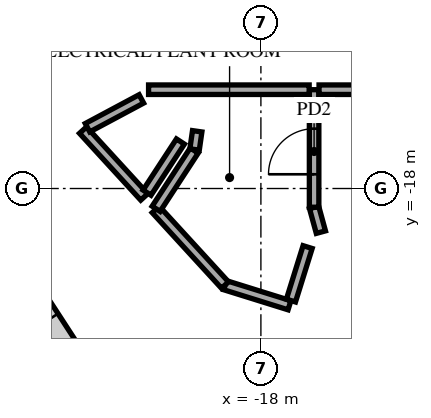
"""IFC4 building model, lengths in metres.
Left out: names, types, materials, properties, quantities, classifications, styles, units other than length and angle.
Written with IfcOpenShell. Run it as: python <this file> out.ifc"""

import sys

from ifc_helpers import new_model, si_unit, direction, frame, frame_2d, origin, place, context, subcontext, project, spatial, rectangle, extrude, element, fill, save


model = new_model("IFC4")
c1 = context("Model", 3, precision=1e-05, world=origin(), true_north=direction((0.0, 1.0)))
c2 = subcontext(c1, "Body", "Model", "MODEL_VIEW")
j1 = project(units=[si_unit("LENGTHUNIT", "METRE"), si_unit("PLANEANGLEUNIT", "RADIAN")], contexts=[c1])
p1 = place(None, origin())
s1 = spatial("IfcSite", under=j1, at=p1, CompositionType="ELEMENT")
p2 = place(p1, origin())
s2 = spatial("IfcBuilding", under=s1, at=p2, CompositionType="ELEMENT")
p3 = place(p2, frame((0.0, 0.0, 344.5)))
s3 = spatial("IfcBuildingStorey", under=s2, at=p3, CompositionType="ELEMENT", Elevation=344.5)
p4 = place(p3, frame((-18.94, -20.545, 0.0), z_axis=(0.0, 0.0, 1.0), x_axis=(0.95472472201, -0.297490680834, 0.0)))
e1 = element("IfcWall", 1, at=p4, inside=s3, PredefinedType="PARTITIONING", context=c2, shape_type="SweptSolid", body=[
    extrude(rectangle(XDim=1.773, YDim=0.25, at=frame_2d((0.886, 0.0))), origin(), (0.0, 0.0, 1.0), 5.3),
])
p5 = place(p3, frame((-20.768, -18.551, 0.0), z_axis=(0.0, 0.0, 1.0), x_axis=(0.6755402779, -0.737323085855, 0.0)))
e2 = element("IfcWall", 2, at=p5, inside=s3, PredefinedType="PARTITIONING", context=c2, shape_type="SweptSolid", body=[
    extrude(rectangle(XDim=2.699, YDim=0.25, at=frame_2d((1.35, 0.0))), origin(), (0.0, 0.0, 1.0), 5.3),
])
p6 = place(p3, frame((-17.209, -20.948, 0.0), z_axis=(0.0, 0.0, 1.0), x_axis=(0.297482665871, 0.954727219422, 0.0)))
e3 = element("IfcWall", 3, at=p6, inside=s3, PredefinedType="PARTITIONING", context=c2, shape_type="SweptSolid", body=[
    extrude(rectangle(XDim=1.474, YDim=0.25, at=frame_2d((0.737, 0.0))), origin(), (0.0, 0.0, 1.0), 5.3),
])
p7 = place(p3, frame((-16.6, -18.497, 0.0), z_axis=(0.0, 0.0, 1.0), x_axis=(0.264769743837, -0.964311662663, 0.0)))
e4 = element("IfcWall", 4, at=p7, inside=s3, PredefinedType="PARTITIONING", context=c2, shape_type="SweptSolid", body=[
    extrude(rectangle(XDim=0.675, YDim=0.25, at=frame_2d((0.337, 0.0))), origin(), (0.0, 0.0, 1.0), 5.3),
])
p8 = place(p3, frame((-20.757, -18.534, 0.0), z_axis=(0.0, 0.0, 1.0), x_axis=(0.546771742196, 0.837281710021, 0.0)))
e5 = element("IfcWall", 5, at=p8, inside=s3, PredefinedType="PARTITIONING", context=c2, shape_type="SweptSolid", body=[
    extrude(rectangle(XDim=1.832, YDim=0.25, at=frame_2d((0.916, 0.0))), origin(), (0.0, 0.0, 1.0), 5.3),
])
p9 = place(p3, frame((-16.6, -18.492, 0.0), z_axis=(0.0, 0.0, 1.0), x_axis=(0.0, 1.0, 0.0)))
e6 = element("IfcWall", 6, at=p9, inside=s3, PredefinedType="PARTITIONING", context=c2, shape_type="SweptSolid", body=[
    extrude(rectangle(XDim=3.092, YDim=0.25, at=frame_2d((1.546, 0.0))), origin(), (0.0, 0.0, 1.0), 5.3),
])
p10 = place(p9, frame((0.867, 0.0, 0.0)))
e7 = element("IfcOpeningElement", 7, at=p10, cuts=e6, PredefinedType="OPENING", context=c2, shape_type="SweptSolid", body=[
    extrude(rectangle(XDim=1.2, YDim=2.1, at=frame_2d((0.6, 1.05))), frame((0.0, 0.135, 0.0), z_axis=(0.0, -1.0, 0.0), x_axis=(1.0, 0.0, 0.0)), (0.0, 0.0, 1.0), 0.27),
])
p11 = place(p3, frame((-22.68, -16.463, 0.0), z_axis=(0.0, 0.0, 1.0), x_axis=(0.675511338211, -0.737349599545, 0.0)))
e8 = element("IfcWall", 8, at=p11, inside=s3, PredefinedType="PARTITIONING", context=c2, shape_type="SweptSolid", body=[
    extrude(rectangle(XDim=2.385, YDim=0.25, at=frame_2d((1.192, 0.0))), origin(), (0.0, 0.0, 1.0), 5.3),
])
p12 = place(p3, frame((-19.745, -16.973, 0.0), z_axis=(0.0, 0.0, 1.0), x_axis=(0.141774522204, 0.989898977095, 0.0)))
e9 = element("IfcWall", 9, at=p12, inside=s3, PredefinedType="PARTITIONING", context=c2, shape_type="SweptSolid", body=[
    extrude(rectangle(XDim=0.484, YDim=0.25, at=frame_2d((0.242, 0.0))), origin(), (0.0, 0.0, 1.0), 5.3),
])
p13 = place(p3, frame((-20.996, -18.109, 0.0), z_axis=(0.0, 0.0, 1.0), x_axis=(0.546717180578, 0.837317337968, 0.0)))
e10 = element("IfcWall", 10, at=p13, inside=s3, PredefinedType="PARTITIONING", context=c2, shape_type="SweptSolid", body=[
    extrude(rectangle(XDim=1.607, YDim=0.25, at=frame_2d((0.804, 0.0))), origin(), (0.0, 0.0, 1.0), 5.3),
])
p14 = place(p3, frame((-22.562, -16.4, 0.0), z_axis=(0.0, 0.0, 1.0), x_axis=(0.881814029952, 0.471597303406, 0.0)))
e11 = element("IfcWall", 11, at=p14, inside=s3, PredefinedType="PARTITIONING", context=c2, shape_type="SweptSolid", body=[
    extrude(rectangle(XDim=1.607, YDim=0.25, at=frame_2d((0.803, 0.0))), origin(), (0.0, 0.0, 1.0), 5.3),
])
p15 = place(p3, frame((-20.956, -15.4, 0.0), z_axis=(0.0, 0.0, 1.0), x_axis=(1.0, 0.0, 0.0)))
e12 = element("IfcWall", 12, at=p15, inside=s3, PredefinedType="PARTITIONING", context=c2, shape_type="SweptSolid", body=[
    extrude(rectangle(XDim=4.226, YDim=0.25, at=frame_2d((2.113, 0.0))), origin(), (0.0, 0.0, 1.0), 4.73),
])
p16 = place(p3, frame((-16.47, -15.4, 0.0), z_axis=(0.0, 0.0, 1.0), x_axis=(1.0, 0.0, 0.0)))
e13 = element("IfcWall", 13, at=p16, inside=s3, PredefinedType="PARTITIONING", context=c2, shape_type="SweptSolid", body=[
    extrude(rectangle(XDim=1.07, YDim=0.25, at=frame_2d((0.535, 0.0))), origin(), (0.0, 0.0, 1.0), 4.466),
])
p17 = place(p3, frame((-21.023, 29.516, 0.0), z_axis=(0.0, 0.0, 1.0), x_axis=(-0.207911686457, -0.978147601661, 0.0)))
e14 = element("IfcWall", 14, at=p17, inside=s3, PredefinedType="STANDARD", context=c2, shape_type="SweptSolid", body=[
    extrude(rectangle(XDim=48.49, YDim=0.6, at=frame_2d((24.245, 0.0))), origin(), (0.0, 0.0, 1.0), 5.3),
])
p18 = place(p17, frame((1.204, 0.0, 0.6)))
e15 = element("IfcOpeningElement", 15, at=p18, cuts=e14, PredefinedType="OPENING", context=c2, shape_type="SweptSolid", body=[
    extrude(rectangle(XDim=2.0, YDim=4.25, at=frame_2d((1.0, 2.125))), frame((0.0, 0.31, 0.0), z_axis=(0.0, -1.0, 0.0), x_axis=(1.0, 0.0, 0.0)), (0.0, 0.0, 1.0), 0.62),
])
p19 = place(p17, frame((5.612, 0.0, 0.6)))
e16 = element("IfcOpeningElement", 16, at=p19, cuts=e14, PredefinedType="OPENING", context=c2, shape_type="SweptSolid", body=[
    extrude(rectangle(XDim=2.0, YDim=4.25, at=frame_2d((1.0, 2.125))), frame((0.0, 0.31, 0.0), z_axis=(0.0, -1.0, 0.0), x_axis=(1.0, 0.0, 0.0)), (0.0, 0.0, 1.0), 0.62),
])
p20 = place(p17, frame((10.021, 0.0, 0.6)))
e17 = element("IfcOpeningElement", 17, at=p20, cuts=e14, PredefinedType="OPENING", context=c2, shape_type="SweptSolid", body=[
    extrude(rectangle(XDim=2.0, YDim=4.25, at=frame_2d((1.0, 2.125))), frame((0.0, 0.31, 0.0), z_axis=(0.0, -1.0, 0.0), x_axis=(1.0, 0.0, 0.0)), (0.0, 0.0, 1.0), 0.62),
])
p21 = place(p17, frame((14.428, 0.0, 0.6)))
e18 = element("IfcOpeningElement", 18, at=p21, cuts=e14, PredefinedType="OPENING", context=c2, shape_type="SweptSolid", body=[
    extrude(rectangle(XDim=2.0, YDim=4.25, at=frame_2d((1.0, 2.125))), frame((0.0, 0.31, 0.0), z_axis=(0.0, -1.0, 0.0), x_axis=(1.0, 0.0, 0.0)), (0.0, 0.0, 1.0), 0.62),
])
p22 = place(p17, frame((18.837, 0.0, 0.6)))
e19 = element("IfcOpeningElement", 19, at=p22, cuts=e14, PredefinedType="OPENING", context=c2, shape_type="SweptSolid", body=[
    extrude(rectangle(XDim=2.0, YDim=4.25, at=frame_2d((1.0, 2.125))), frame((0.0, 0.31, 0.0), z_axis=(0.0, -1.0, 0.0), x_axis=(1.0, 0.0, 0.0)), (0.0, 0.0, 1.0), 0.62),
])
p23 = place(p17, frame((23.245, 0.0, 0.6)))
e20 = element("IfcOpeningElement", 20, at=p23, cuts=e14, PredefinedType="OPENING", context=c2, shape_type="SweptSolid", body=[
    extrude(rectangle(XDim=2.0, YDim=4.25, at=frame_2d((1.0, 2.125))), frame((0.0, 0.31, 0.0), z_axis=(0.0, -1.0, 0.0), x_axis=(1.0, 0.0, 0.0)), (0.0, 0.0, 1.0), 0.62),
])
p24 = place(p17, frame((32.061, 0.0, 0.6)))
e21 = element("IfcOpeningElement", 21, at=p24, cuts=e14, PredefinedType="OPENING", context=c2, shape_type="SweptSolid", body=[
    extrude(rectangle(XDim=2.0, YDim=4.25, at=frame_2d((1.0, 2.125))), frame((0.0, 0.31, 0.0), z_axis=(0.0, -1.0, 0.0), x_axis=(1.0, 0.0, 0.0)), (0.0, 0.0, 1.0), 0.62),
])
p25 = place(p17, frame((36.469, 0.0, 0.6)))
e22 = element("IfcOpeningElement", 22, at=p25, cuts=e14, PredefinedType="OPENING", context=c2, shape_type="SweptSolid", body=[
    extrude(rectangle(XDim=2.0, YDim=4.25, at=frame_2d((1.0, 2.125))), frame((0.0, 0.31, 0.0), z_axis=(0.0, -1.0, 0.0), x_axis=(1.0, 0.0, 0.0)), (0.0, 0.0, 1.0), 0.62),
])
p26 = place(p17, frame((40.877, 0.0, 0.6)))
e23 = element("IfcOpeningElement", 23, at=p26, cuts=e14, PredefinedType="OPENING", context=c2, shape_type="SweptSolid", body=[
    extrude(rectangle(XDim=2.0, YDim=4.25, at=frame_2d((1.0, 2.125))), frame((0.0, 0.31, 0.0), z_axis=(0.0, -1.0, 0.0), x_axis=(1.0, 0.0, 0.0)), (0.0, 0.0, 1.0), 0.62),
])
p27 = place(p17, frame((45.285, 0.0, 0.6)))
e24 = element("IfcOpeningElement", 24, at=p27, cuts=e14, PredefinedType="OPENING", context=c2, shape_type="SweptSolid", body=[
    extrude(rectangle(XDim=2.0, YDim=4.25, at=frame_2d((1.0, 2.125))), frame((0.0, 0.31, 0.0), z_axis=(0.0, -1.0, 0.0), x_axis=(1.0, 0.0, 0.0)), (0.0, 0.0, 1.0), 0.62),
])
p28 = place(p3, frame((-27.552, -15.354, 0.0), z_axis=(0.0, 0.0, 1.0), x_axis=(0.544637978142, -0.838671254286, 0.0)))
e25 = element("IfcWall", 25, at=p28, inside=s3, PredefinedType="STANDARD", context=c2, shape_type="SweptSolid", body=[
    extrude(rectangle(XDim=8.5, YDim=0.6, at=frame_2d((4.25, 0.0))), origin(), (0.0, 0.0, 1.0), 5.3),
])
p29 = place(p28, frame((1.225, 0.0, 0.6)))
e26 = element("IfcOpeningElement", 26, at=p29, cuts=e25, PredefinedType="OPENING", context=c2, shape_type="SweptSolid", body=[
    extrude(rectangle(XDim=1.8, YDim=4.25, at=frame_2d((0.9, 2.125))), frame((0.0, 0.31, 0.0), z_axis=(0.0, -1.0, 0.0), x_axis=(1.0, 0.0, 0.0)), (0.0, 0.0, 1.0), 0.62),
])
p30 = place(p28, frame((5.475, 0.0, 0.6)))
e27 = element("IfcOpeningElement", 27, at=p30, cuts=e25, PredefinedType="OPENING", context=c2, shape_type="SweptSolid", body=[
    extrude(rectangle(XDim=1.8, YDim=4.25, at=frame_2d((0.9, 2.125))), frame((0.0, 0.31, 0.0), z_axis=(0.0, -1.0, 0.0), x_axis=(1.0, 0.0, 0.0)), (0.0, 0.0, 1.0), 0.62),
])
p31 = place(p10, origin())
e28 = element("IfcDoor", 28, at=p31, inside=s3, OperationType="SINGLE_SWING_RIGHT", PredefinedType="DOOR", context=c2, shape_type="SweptSolid", body=[
    extrude(rectangle(XDim=1.2, YDim=2.1, at=frame_2d((0.6, 1.05))), frame((0.0, 0.025, 0.0), z_axis=(0.0, -1.0, 0.0), x_axis=(1.0, 0.0, 0.0)), (0.0, 0.0, 1.0), 0.05),
])
fill(e7, e28)
save(model, sys.argv[1])
